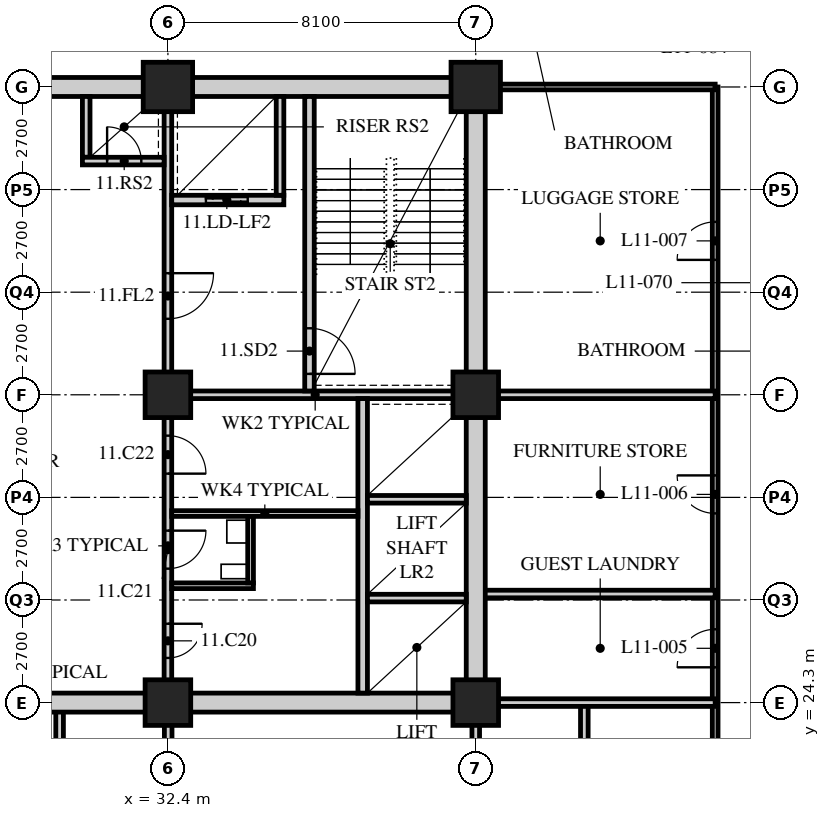
"""IFC4 building model, lengths in metres.
Left out: names, types, materials, properties, quantities, classifications, styles, units other than length and angle.
Written with IfcOpenShell. Run it as: python <this file> out.ifc"""

import sys

from ifc_helpers import new_model, si_unit, direction, frame, frame_2d, origin, origin_2d, place, context, subcontext, project, spatial, rectangle, hollow_rectangle, extrude, element, fill, save


model = new_model("IFC4")
c1 = context("Model", 3, precision=1e-05, world=origin(), true_north=direction((0.0, 1.0)))
c2 = subcontext(c1, "Body", "Model", "MODEL_VIEW")
j1 = project(units=[si_unit("LENGTHUNIT", "METRE"), si_unit("PLANEANGLEUNIT", "RADIAN")], contexts=[c1])
p1 = place(None, origin())
s1 = spatial("IfcSite", under=j1, at=p1, CompositionType="ELEMENT")
p2 = place(p1, origin())
s2 = spatial("IfcBuilding", under=s1, at=p2, CompositionType="ELEMENT")
p3 = place(p2, frame((0.0, 0.0, 50.0)))
s3 = spatial("IfcBuildingStorey", under=s2, at=p3, CompositionType="ELEMENT", Elevation=50.0)
for number, where, z_axis, x_axis in (
    (1, (32.4, 24.3, 0.0), (0.0, 0.0, 1.0), (1.0, 0.0, 0.0)),
    (2, (32.4, 32.4, 0.0), (0.0, 0.0, 1.0), (1.0, 0.0, 0.0)),
):
    element("IfcColumn", number, at=place(p3, frame(where, z_axis=z_axis, x_axis=x_axis)), inside=s3, PredefinedType="COLUMN", context=c2, shape_type="SweptSolid", body=[
        extrude(hollow_rectangle(XDim=1.2, YDim=1.2, WallThickness=0.12, at=origin_2d()), origin(), (0.0, 0.0, 1.0), 3.4),
    ])
p4 = place(p3, frame((32.4, 40.5, 0.0), z_axis=(0.0, 0.0, 1.0), x_axis=(1.0, 0.0, 0.0)))
e3 = element("IfcColumn", 3, at=p4, inside=s3, PredefinedType="COLUMN", context=c2, shape_type="SweptSolid", body=[
    extrude(hollow_rectangle(XDim=1.3, YDim=1.3, WallThickness=0.13, at=origin_2d()), origin(), (0.0, 0.0, 1.0), 3.4),
])
for number, where, z_axis, x_axis in (
    (4, (40.5, 24.3, 0.0), (0.0, 0.0, 1.0), (1.0, 0.0, 0.0)),
    (5, (40.5, 32.4, 0.0), (0.0, 0.0, 1.0), (1.0, 0.0, 0.0)),
):
    element("IfcColumn", number, at=place(p3, frame(where, z_axis=z_axis, x_axis=x_axis)), inside=s3, PredefinedType="COLUMN", context=c2, shape_type="SweptSolid", body=[
        extrude(hollow_rectangle(XDim=1.2, YDim=1.2, WallThickness=0.12, at=origin_2d()), origin(), (0.0, 0.0, 1.0), 3.4),
    ])
p5 = place(p3, frame((40.5, 40.5, 0.0), z_axis=(0.0, 0.0, 1.0), x_axis=(1.0, 0.0, 0.0)))
e6 = element("IfcColumn", 6, at=p5, inside=s3, PredefinedType="COLUMN", context=c2, shape_type="SweptSolid", body=[
    extrude(hollow_rectangle(XDim=1.3, YDim=1.3, WallThickness=0.13, at=origin_2d()), origin(), (0.0, 0.0, 1.0), 3.4),
])
p6 = place(p3, frame((46.8, 18.0, 0.0), z_axis=(0.0, 0.0, 1.0), x_axis=(0.0, 1.0, 0.0)))
e7 = element("IfcWall", 7, at=p6, inside=s3, PredefinedType="PARTITIONING", context=c2, shape_type="SweptSolid", body=[
    extrude(rectangle(XDim=22.5, YDim=0.15, at=frame_2d((11.25, 0.0))), origin(), (0.0, 0.0, 1.0), 3.19),
])
p7 = place(p6, frame((7.229, 0.0, 0.0)))
e8 = element("IfcOpeningElement", 8, at=p7, cuts=e7, PredefinedType="OPENING", context=c2, shape_type="SweptSolid", body=[
    extrude(rectangle(XDim=1.0, YDim=2.1, at=frame_2d((0.5, 1.05))), frame((0.0, 0.085, 0.0), z_axis=(0.0, -1.0, 0.0), x_axis=(1.0, 0.0, 0.0)), (0.0, 0.0, 1.0), 0.17),
])
p8 = place(p6, frame((11.279, 0.0, 0.0)))
e9 = element("IfcOpeningElement", 9, at=p8, cuts=e7, PredefinedType="OPENING", context=c2, shape_type="SweptSolid", body=[
    extrude(rectangle(XDim=1.0, YDim=2.1, at=frame_2d((0.5, 1.05))), frame((0.0, 0.085, 0.0), z_axis=(0.0, -1.0, 0.0), x_axis=(1.0, 0.0, 0.0)), (0.0, 0.0, 1.0), 0.17),
])
p9 = place(p6, frame((17.95, 0.0, 0.0)))
e10 = element("IfcOpeningElement", 10, at=p9, cuts=e7, PredefinedType="OPENING", context=c2, shape_type="SweptSolid", body=[
    extrude(rectangle(XDim=1.0, YDim=2.1, at=frame_2d((0.5, 1.05))), frame((0.0, 0.085, 0.0), z_axis=(0.0, -1.0, 0.0), x_axis=(1.0, 0.0, 0.0)), (0.0, 0.0, 1.0), 0.17),
])
p10 = place(p3, frame((46.8, 40.5, 0.0), z_axis=(0.0, 0.0, 1.0), x_axis=(-1.0, 0.0, 0.0)))
e11 = element("IfcWall", 11, at=p10, inside=s3, PredefinedType="PARTITIONING", context=c2, shape_type="SweptSolid", body=[
    extrude(rectangle(XDim=6.1, YDim=0.15, at=frame_2d((3.05, 0.0))), origin(), (0.0, 0.0, 1.0), 2.578),
])
p11 = place(p3, frame((40.5, 32.4, 0.0), z_axis=(0.0, 0.0, 1.0), x_axis=(1.0, 0.0, 0.0)))
e12 = element("IfcWall", 12, at=p11, inside=s3, PredefinedType="SOLIDWALL", context=c2, shape_type="SweptSolid", body=[
    extrude(rectangle(XDim=6.3, YDim=0.2, at=frame_2d((3.15, 0.0))), origin(), (0.0, 0.0, 1.0), 2.578),
])
p12 = place(p3, frame((46.8, 27.157, 0.0), z_axis=(0.0, 0.0, 1.0), x_axis=(-1.0, 0.0, 0.0)))
e13 = element("IfcWall", 13, at=p12, inside=s3, PredefinedType="SOLIDWALL", context=c2, shape_type="SweptSolid", body=[
    extrude(rectangle(XDim=6.3, YDim=0.2, at=frame_2d((3.15, 0.0))), origin(), (0.0, 0.0, 1.0), 3.19),
])
for number, where, z_axis, x_axis in (
    (14, (40.5, 18.0, 0.0), (0.0, 0.0, 1.0), (0.0, 1.0, 0.0)),
    (15, (32.407, 18.0, 0.0), (0.0, 0.0, 1.0), (0.0, 1.0, 0.0)),
):
    element("IfcWall", number, at=place(p3, frame(where, z_axis=z_axis, x_axis=x_axis)), inside=s3, PredefinedType="SOLIDWALL", context=c2, shape_type="SweptSolid", body=[
        extrude(rectangle(XDim=6.3, YDim=0.2, at=frame_2d((3.15, 0.0))), origin(), (0.0, 0.0, 1.0), 2.578),
    ])
for number, where, z_axis, x_axis in (
    (16, (43.357, 18.0, 0.0), (0.0, 0.0, 1.0), (0.0, 1.0, 0.0)),
    (17, (29.55, 18.0, 0.0), (0.0, 0.0, 1.0), (0.0, 1.0, 0.0)),
):
    element("IfcWall", number, at=place(p3, frame(where, z_axis=z_axis, x_axis=x_axis)), inside=s3, PredefinedType="SOLIDWALL", context=c2, shape_type="SweptSolid", body=[
        extrude(rectangle(XDim=6.3, YDim=0.2, at=frame_2d((3.15, 0.0))), origin(), (0.0, 0.0, 1.0), 3.19),
    ])
p13 = place(p3, frame((40.5, 24.3, 0.0), z_axis=(0.0, 0.0, 1.0), x_axis=(1.0, 0.0, 0.0)))
e18 = element("IfcWall", 18, at=p13, inside=s3, PredefinedType="SOLIDWALL", context=c2, shape_type="SweptSolid", body=[
    extrude(rectangle(XDim=6.3, YDim=0.2, at=frame_2d((3.15, 0.0))), origin(), (0.0, 0.0, 1.0), 2.578),
])
p14 = place(p3, frame((15.95, 24.3, 0.0), z_axis=(0.0, 0.0, 1.0), x_axis=(1.0, 0.0, 0.0)))
e19 = element("IfcWall", 19, at=p14, inside=s3, PredefinedType="SOLIDWALL", context=c2, shape_type="SweptSolid", body=[
    extrude(rectangle(XDim=24.8, YDim=0.5, at=frame_2d((12.4, 0.0))), origin(), (0.0, 0.0, 1.0), 2.54),
])
p15 = place(p14, frame((11.5, 0.0, 0.0)))
e20 = element("IfcOpeningElement", 20, at=p15, cuts=e19, PredefinedType="OPENING", context=c2, shape_type="SweptSolid", body=[
    extrude(rectangle(XDim=1.8, YDim=2.4, at=frame_2d((0.9, 1.2))), frame((0.0, 0.26, 0.0), z_axis=(0.0, -1.0, 0.0), x_axis=(1.0, 0.0, 0.0)), (0.0, 0.0, 1.0), 0.52),
])
p16 = place(p3, frame((15.95, 40.5, 0.0), z_axis=(0.0, 0.0, 1.0), x_axis=(1.0, 0.0, 0.0)))
e21 = element("IfcWall", 21, at=p16, inside=s3, PredefinedType="SOLIDWALL", context=c2, shape_type="SweptSolid", body=[
    extrude(rectangle(XDim=24.8, YDim=0.5, at=frame_2d((12.4, 0.0))), origin(), (0.0, 0.0, 1.0), 2.54),
])
p17 = place(p16, frame((11.5, 0.0, 0.0)))
e22 = element("IfcOpeningElement", 22, at=p17, cuts=e21, PredefinedType="OPENING", context=c2, shape_type="SweptSolid", body=[
    extrude(rectangle(XDim=1.8, YDim=2.4, at=frame_2d((0.9, 1.2))), frame((0.0, 0.26, 0.0), z_axis=(0.0, -1.0, 0.0), x_axis=(1.0, 0.0, 0.0)), (0.0, 0.0, 1.0), 0.52),
])
p18 = place(p3, frame((40.5, 24.55, 0.0), z_axis=(0.0, 0.0, 1.0), x_axis=(0.0, 1.0, 0.0)))
e23 = element("IfcWall", 23, at=p18, inside=s3, PredefinedType="SOLIDWALL", context=c2, shape_type="SweptSolid", body=[
    extrude(rectangle(XDim=15.7, YDim=0.5, at=frame_2d((7.85, 0.0))), origin(), (0.0, 0.0, 1.0), 2.578),
])
p19 = place(p3, frame((32.3, 32.4, 0.0), z_axis=(0.0, 0.0, 1.0), x_axis=(1.0, 0.0, 0.0)))
e24 = element("IfcWall", 24, at=p19, inside=s3, PredefinedType="SOLIDWALL", context=c2, shape_type="SweptSolid", body=[
    extrude(rectangle(XDim=7.95, YDim=0.2, at=frame_2d((3.975, 0.0))), origin(), (0.0, 0.0, 1.0), 2.578),
])
p20 = place(p3, frame((32.4, 32.5, 0.0), z_axis=(0.0, 0.0, 1.0), x_axis=(0.0, 1.0, 0.0)))
e25 = element("IfcWall", 25, at=p20, inside=s3, PredefinedType="SOLIDWALL", context=c2, shape_type="SweptSolid", body=[
    extrude(rectangle(XDim=7.75, YDim=0.2, at=frame_2d((3.875, 0.0))), origin(), (0.0, 0.0, 1.0), 2.578),
])
p21 = place(p20, frame((1.9, 0.0, 0.0)))
e26 = element("IfcOpeningElement", 26, at=p21, cuts=e25, PredefinedType="OPENING", context=c2, shape_type="SweptSolid", body=[
    extrude(rectangle(XDim=1.2, YDim=2.1, at=frame_2d((0.6, 1.05))), frame((0.0, 0.11, 0.0), z_axis=(0.0, -1.0, 0.0), x_axis=(1.0, 0.0, 0.0)), (0.0, 0.0, 1.0), 0.22),
])
p22 = place(p3, frame((37.525, 24.55, 0.0), z_axis=(0.0, 0.0, 1.0), x_axis=(0.0, 1.0, 0.0)))
e27 = element("IfcWall", 27, at=p22, inside=s3, PredefinedType="SOLIDWALL", context=c2, shape_type="SweptSolid", body=[
    extrude(rectangle(XDim=7.75, YDim=0.25, at=frame_2d((3.875, 0.0))), origin(), (0.0, 0.0, 1.0), 3.19),
])
for number, where, z_axis, x_axis in (
    (28, (37.65, 27.05, 0.0), (0.0, 0.0, 1.0), (1.0, 0.0, 0.0)),
    (29, (37.65, 29.65, 0.0), (0.0, 0.0, 1.0), (1.0, 0.0, 0.0)),
):
    element("IfcWall", number, at=place(p3, frame(where, z_axis=z_axis, x_axis=x_axis)), inside=s3, PredefinedType="SOLIDWALL", context=c2, shape_type="SweptSolid", body=[
        extrude(rectangle(XDim=2.6, YDim=0.2, at=frame_2d((1.3, 0.0))), origin(), (0.0, 0.0, 1.0), 3.19),
    ])
p23 = place(p3, frame((36.125, 32.5, 0.0), z_axis=(0.0, 0.0, 1.0), x_axis=(0.0, 1.0, 0.0)))
e30 = element("IfcWall", 30, at=p23, inside=s3, PredefinedType="SOLIDWALL", context=c2, shape_type="SweptSolid", body=[
    extrude(rectangle(XDim=7.75, YDim=0.25, at=frame_2d((3.875, 0.0))), origin(), (0.0, 0.0, 1.0), 3.19),
])
p24 = place(p23, frame((0.45, 0.0, 0.0)))
e31 = element("IfcOpeningElement", 31, at=p24, cuts=e30, PredefinedType="OPENING", context=c2, shape_type="SweptSolid", body=[
    extrude(rectangle(XDim=1.2, YDim=2.1, at=frame_2d((0.6, 1.05))), frame((0.0, 0.135, 0.0), z_axis=(0.0, -1.0, 0.0), x_axis=(1.0, 0.0, 0.0)), (0.0, 0.0, 1.0), 0.27),
])
p25 = place(p3, frame((32.5, 37.525, 0.0), z_axis=(0.0, 0.0, 1.0), x_axis=(1.0, 0.0, 0.0)))
e32 = element("IfcWall", 32, at=p25, inside=s3, PredefinedType="SOLIDWALL", context=c2, shape_type="SweptSolid", body=[
    extrude(rectangle(XDim=2.95, YDim=0.25, at=frame_2d((1.475, 0.0))), origin(), (0.0, 0.0, 1.0), 3.19),
])
p26 = place(p25, frame((0.9, 0.0, 0.0)))
e33 = element("IfcOpeningElement", 33, at=p26, cuts=e32, PredefinedType="OPENING", context=c2, shape_type="SweptSolid", body=[
    extrude(rectangle(XDim=1.1, YDim=2.4, at=frame_2d((0.55, 1.2))), frame((0.0, 0.135, 0.0), z_axis=(0.0, -1.0, 0.0), x_axis=(1.0, 0.0, 0.0)), (0.0, 0.0, 1.0), 0.27),
])
p27 = place(p3, frame((35.35, 37.65, 0.0), z_axis=(0.0, 0.0, 1.0), x_axis=(0.0, 1.0, 0.0)))
e34 = element("IfcWall", 34, at=p27, inside=s3, PredefinedType="SOLIDWALL", context=c2, shape_type="SweptSolid", body=[
    extrude(rectangle(XDim=2.6, YDim=0.2, at=frame_2d((1.3, 0.0))), origin(), (0.0, 0.0, 1.0), 3.19),
])
p28 = place(p3, frame((30.25, 38.65, 0.0), z_axis=(0.0, 0.0, 1.0), x_axis=(0.0, 1.0, 0.0)))
e35 = element("IfcWall", 35, at=p28, inside=s3, PredefinedType="SOLIDWALL", context=c2, shape_type="SweptSolid", body=[
    extrude(rectangle(XDim=1.6, YDim=0.2, at=frame_2d((0.8, 0.0))), origin(), (0.0, 0.0, 1.0), 3.19),
])
p29 = place(p3, frame((30.15, 38.55, 0.0), z_axis=(0.0, 0.0, 1.0), x_axis=(1.0, 0.0, 0.0)))
e36 = element("IfcWall", 36, at=p29, inside=s3, PredefinedType="SOLIDWALL", context=c2, shape_type="SweptSolid", body=[
    extrude(rectangle(XDim=2.15, YDim=0.2, at=frame_2d((1.075, 0.0))), origin(), (0.0, 0.0, 1.0), 3.19),
])
p30 = place(p29, frame((0.65, 0.0, 0.0)))
e37 = element("IfcOpeningElement", 37, at=p30, cuts=e36, PredefinedType="OPENING", context=c2, shape_type="SweptSolid", body=[
    extrude(rectangle(XDim=0.9, YDim=2.1, at=frame_2d((0.45, 1.05))), frame((0.0, 0.11, 0.0), z_axis=(0.0, -1.0, 0.0), x_axis=(1.0, 0.0, 0.0)), (0.0, 0.0, 1.0), 0.22),
])
p31 = place(p3, frame((32.4, 24.55, 0.0), z_axis=(0.0, 0.0, 1.0), x_axis=(0.0, 1.0, 0.0)))
e38 = element("IfcWall", 38, at=p31, inside=s3, PredefinedType="PARTITIONING", context=c2, shape_type="SweptSolid", body=[
    extrude(rectangle(XDim=7.75, YDim=0.2, at=frame_2d((3.875, 0.0))), origin(), (0.0, 0.0, 1.0), 2.578),
])
p32 = place(p31, frame((0.925, 0.0, 0.0)))
e39 = element("IfcOpeningElement", 39, at=p32, cuts=e38, PredefinedType="OPENING", context=c2, shape_type="SweptSolid", body=[
    extrude(rectangle(XDim=0.9, YDim=2.1, at=frame_2d((0.45, 1.05))), frame((0.0, 0.11, 0.0), z_axis=(0.0, -1.0, 0.0), x_axis=(1.0, 0.0, 0.0)), (0.0, 0.0, 1.0), 0.22),
])
p33 = place(p31, frame((3.275, 0.0, 0.0)))
e40 = element("IfcOpeningElement", 40, at=p33, cuts=e38, PredefinedType="OPENING", context=c2, shape_type="SweptSolid", body=[
    extrude(rectangle(XDim=1.0, YDim=2.1, at=frame_2d((0.5, 1.05))), frame((0.0, 0.11, 0.0), z_axis=(0.0, -1.0, 0.0), x_axis=(1.0, 0.0, 0.0)), (0.0, 0.0, 1.0), 0.22),
])
p34 = place(p31, frame((5.775, 0.0, 0.0)))
e41 = element("IfcOpeningElement", 41, at=p34, cuts=e38, PredefinedType="OPENING", context=c2, shape_type="SweptSolid", body=[
    extrude(rectangle(XDim=1.0, YDim=2.1, at=frame_2d((0.5, 1.05))), frame((0.0, 0.11, 0.0), z_axis=(0.0, -1.0, 0.0), x_axis=(1.0, 0.0, 0.0)), (0.0, 0.0, 1.0), 0.22),
])
p35 = place(p3, frame((32.5, 27.375, 0.0), z_axis=(0.0, 0.0, 1.0), x_axis=(1.0, 0.0, 0.0)))
e42 = element("IfcWall", 42, at=p35, inside=s3, PredefinedType="PARTITIONING", context=c2, shape_type="SweptSolid", body=[
    extrude(rectangle(XDim=2.15, YDim=0.15, at=frame_2d((1.075, 0.0))), origin(), (0.0, 0.0, 1.0), 3.19),
])
p36 = place(p3, frame((32.5, 29.275, 0.0), z_axis=(0.0, 0.0, 1.0), x_axis=(1.0, 0.0, 0.0)))
e43 = element("IfcWall", 43, at=p36, inside=s3, PredefinedType="PARTITIONING", context=c2, shape_type="SweptSolid", body=[
    extrude(rectangle(XDim=4.9, YDim=0.15, at=frame_2d((2.45, 0.0))), origin(), (0.0, 0.0, 1.0), 3.19),
])
p37 = place(p3, frame((34.575, 27.45, 0.0), z_axis=(0.0, 0.0, 1.0), x_axis=(0.0, 1.0, 0.0)))
e44 = element("IfcWall", 44, at=p37, inside=s3, PredefinedType="PARTITIONING", context=c2, shape_type="SweptSolid", body=[
    extrude(rectangle(XDim=1.75, YDim=0.15, at=frame_2d((0.875, 0.0))), origin(), (0.0, 0.0, 1.0), 3.19),
])
p38 = place(p7, origin())
e45 = element("IfcDoor", 45, at=p38, inside=s3, OperationType="SINGLE_SWING_LEFT", PredefinedType="DOOR", context=c2, shape_type="SweptSolid", body=[
    extrude(rectangle(XDim=1.0, YDim=2.1, at=frame_2d((0.5, 1.05))), frame((0.0, 0.025, 0.0), z_axis=(0.0, -1.0, 0.0), x_axis=(1.0, 0.0, 0.0)), (0.0, 0.0, 1.0), 0.05),
])
fill(e8, e45)
p39 = place(p8, origin())
e46 = element("IfcDoor", 46, at=p39, inside=s3, OperationType="SINGLE_SWING_RIGHT", PredefinedType="DOOR", context=c2, shape_type="SweptSolid", body=[
    extrude(rectangle(XDim=1.0, YDim=2.1, at=frame_2d((0.5, 1.05))), frame((0.0, 0.025, 0.0), z_axis=(0.0, -1.0, 0.0), x_axis=(1.0, 0.0, 0.0)), (0.0, 0.0, 1.0), 0.05),
])
fill(e9, e46)
p40 = place(p9, origin())
e47 = element("IfcDoor", 47, at=p40, inside=s3, OperationType="SINGLE_SWING_LEFT", PredefinedType="DOOR", context=c2, shape_type="SweptSolid", body=[
    extrude(rectangle(XDim=1.0, YDim=2.1, at=frame_2d((0.5, 1.05))), frame((0.0, 0.025, 0.0), z_axis=(0.0, -1.0, 0.0), x_axis=(1.0, 0.0, 0.0)), (0.0, 0.0, 1.0), 0.05),
])
fill(e10, e47)
p41 = place(p32, origin())
e48 = element("IfcDoor", 48, at=p41, inside=s3, OperationType="SINGLE_SWING_LEFT", PredefinedType="DOOR", context=c2, shape_type="SweptSolid", body=[
    extrude(rectangle(XDim=0.9, YDim=2.1, at=frame_2d((0.45, 1.05))), frame((0.0, 0.025, 0.0), z_axis=(0.0, -1.0, 0.0), x_axis=(1.0, 0.0, 0.0)), (0.0, 0.0, 1.0), 0.05),
])
fill(e39, e48)
p42 = place(p33, origin())
e49 = element("IfcDoor", 49, at=p42, inside=s3, OperationType="SINGLE_SWING_LEFT", PredefinedType="DOOR", context=c2, shape_type="SweptSolid", body=[
    extrude(rectangle(XDim=1.0, YDim=2.1, at=frame_2d((0.5, 1.05))), frame((0.0, 0.025, 0.0), z_axis=(0.0, -1.0, 0.0), x_axis=(1.0, 0.0, 0.0)), (0.0, 0.0, 1.0), 0.05),
])
fill(e40, e49)
p43 = place(p34, origin())
e50 = element("IfcDoor", 50, at=p43, inside=s3, OperationType="SINGLE_SWING_RIGHT", PredefinedType="DOOR", context=c2, shape_type="SweptSolid", body=[
    extrude(rectangle(XDim=1.0, YDim=2.1, at=frame_2d((0.5, 1.05))), frame((0.0, 0.025, 0.0), z_axis=(0.0, -1.0, 0.0), x_axis=(1.0, 0.0, 0.0)), (0.0, 0.0, 1.0), 0.05),
])
fill(e41, e50)
p44 = place(p24, origin())
e51 = element("IfcDoor", 51, at=p44, inside=s3, OperationType="SINGLE_SWING_RIGHT", PredefinedType="DOOR", context=c2, shape_type="SweptSolid", body=[
    extrude(rectangle(XDim=1.2, YDim=2.1, at=frame_2d((0.6, 1.05))), frame((0.0, 0.025, 0.0), z_axis=(0.0, -1.0, 0.0), x_axis=(1.0, 0.0, 0.0)), (0.0, 0.0, 1.0), 0.05),
])
fill(e31, e51)
p45 = place(p21, origin())
e52 = element("IfcDoor", 52, at=p45, inside=s3, OperationType="SINGLE_SWING_LEFT", PredefinedType="DOOR", context=c2, shape_type="SweptSolid", body=[
    extrude(rectangle(XDim=1.2, YDim=2.1, at=frame_2d((0.6, 1.05))), frame((0.0, 0.025, 0.0), z_axis=(0.0, -1.0, 0.0), x_axis=(1.0, 0.0, 0.0)), (0.0, 0.0, 1.0), 0.05),
])
fill(e26, e52)
p46 = place(p30, origin())
e53 = element("IfcDoor", 53, at=p46, inside=s3, OperationType="SINGLE_SWING_LEFT", PredefinedType="DOOR", context=c2, shape_type="SweptSolid", body=[
    extrude(rectangle(XDim=0.9, YDim=2.1, at=frame_2d((0.45, 1.05))), frame((0.0, 0.025, 0.0), z_axis=(0.0, -1.0, 0.0), x_axis=(1.0, 0.0, 0.0)), (0.0, 0.0, 1.0), 0.05),
])
fill(e37, e53)
p47 = place(p26, origin())
e54 = element("IfcDoor", 54, at=p47, inside=s3, OperationType="DOUBLE_DOOR_SLIDING", PredefinedType="DOOR", context=c2, shape_type="SweptSolid", body=[
    extrude(rectangle(XDim=1.1, YDim=2.4, at=frame_2d((0.55, 1.2))), frame((0.0, 0.025, 0.0), z_axis=(0.0, -1.0, 0.0), x_axis=(1.0, 0.0, 0.0)), (0.0, 0.0, 1.0), 0.05),
])
fill(e33, e54)
save(model, sys.argv[1])
